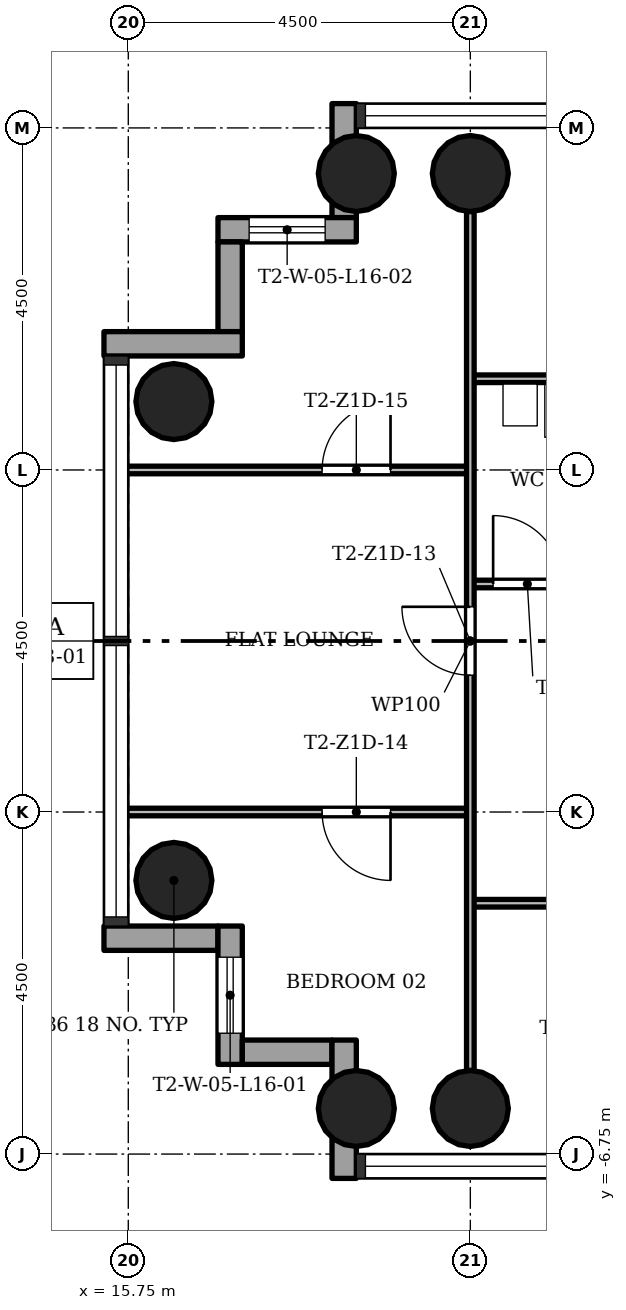
"""IFC4 building model, lengths in metres.
Left out: names, types, materials, properties, quantities, classifications, styles, units other than length and angle.
Written with IfcOpenShell. Run it as: python <this file> out.ifc"""

import sys

from ifc_helpers import new_model, si_unit, direction, frame, frame_2d, origin, origin_2d, place, context, subcontext, project, spatial, rectangle, hollow_circle, extrude, element, fill, save


model = new_model("IFC4")
c1 = context("Model", 3, precision=1e-05, world=origin(), true_north=direction((0.0, 1.0)))
c2 = subcontext(c1, "Body", "Model", "MODEL_VIEW")
j1 = project(units=[si_unit("LENGTHUNIT", "METRE"), si_unit("PLANEANGLEUNIT", "RADIAN")], contexts=[c1])
p1 = place(None, origin())
s1 = spatial("IfcSite", under=j1, at=p1, CompositionType="ELEMENT")
p2 = place(p1, origin())
s2 = spatial("IfcBuilding", under=s1, at=p2, CompositionType="ELEMENT")
p3 = place(p2, frame((0.0, 0.0, 61.9)))
s3 = spatial("IfcBuildingStorey", under=s2, at=p3, CompositionType="ELEMENT", Elevation=61.9)
for number, where, z_axis, x_axis in (
    (1, (20.25, 6.15, 0.0), (0.0, 0.0, 1.0), (1.0, 0.0, 0.0)),
    (2, (20.25, -6.15, 0.0), (0.0, 0.0, 1.0), (1.0, 0.0, 0.0)),
    (3, (18.75, 6.15, 0.0), (0.0, 0.0, 1.0), (1.0, 0.0, 0.0)),
    (4, (18.75, -6.15, 0.0), (0.0, 0.0, 1.0), (1.0, 0.0, 0.0)),
    (5, (16.35, 3.15, 0.0), (0.0, 0.0, 1.0), (1.0, 0.0, 0.0)),
    (6, (16.35, -3.15, 0.0), (0.0, 0.0, 1.0), (1.0, 0.0, 0.0)),
):
    element("IfcColumn", number, at=place(p3, frame(where, z_axis=z_axis, x_axis=x_axis)), inside=s3, PredefinedType="COLUMN", context=c2, shape_type="SweptSolid", body=[
        extrude(hollow_circle(Radius=0.5, WallThickness=0.036, at=origin_2d()), origin(), (0.0, 0.0, 1.0), 3.4),
    ])
p4 = place(p3, frame((18.59, 7.07, -0.3), z_axis=(0.0, 0.0, 1.0), x_axis=(0.0, -1.0, 0.0)))
e7 = element("IfcWall", 7, at=p4, inside=s3, PredefinedType="STANDARD", context=c2, shape_type="SweptSolid", body=[
    extrude(rectangle(XDim=1.5, YDim=0.32, at=frame_2d((0.75, 0.0))), origin(), (0.0, 0.0, 1.0), 3.4),
])
p5 = place(p3, frame((18.75, 5.41, -0.3), z_axis=(0.0, 0.0, 1.0), x_axis=(-1.0, 0.0, 0.0)))
e8 = element("IfcWall", 8, at=p5, inside=s3, PredefinedType="STANDARD", context=c2, shape_type="SweptSolid", body=[
    extrude(rectangle(XDim=1.82, YDim=0.32, at=frame_2d((0.91, 0.0))), origin(), (0.0, 0.0, 1.0), 3.4),
])
p6 = place(p5, frame((0.41, 0.0, 1.2)))
e9 = element("IfcOpeningElement", 9, at=p6, cuts=e8, PredefinedType="OPENING", context=c2, shape_type="SweptSolid", body=[
    extrude(rectangle(XDim=1.0, YDim=1.5, at=frame_2d((0.5, 0.75))), frame((0.0, 0.17, 0.0), z_axis=(0.0, -1.0, 0.0), x_axis=(1.0, 0.0, 0.0)), (0.0, 0.0, 1.0), 0.34),
])
p7 = place(p3, frame((17.09, 5.25, -0.3), z_axis=(0.0, 0.0, 1.0), x_axis=(0.0, -1.0, 0.0)))
e10 = element("IfcWall", 10, at=p7, inside=s3, PredefinedType="STANDARD", context=c2, shape_type="SweptSolid", body=[
    extrude(rectangle(XDim=1.18, YDim=0.32, at=frame_2d((0.59, 0.0))), origin(), (0.0, 0.0, 1.0), 3.4),
])
p8 = place(p3, frame((17.25, 3.91, -0.3), z_axis=(0.0, 0.0, 1.0), x_axis=(-1.0, 0.0, 0.0)))
e11 = element("IfcWall", 11, at=p8, inside=s3, PredefinedType="STANDARD", context=c2, shape_type="SweptSolid", body=[
    extrude(rectangle(XDim=1.82, YDim=0.32, at=frame_2d((0.91, 0.0))), origin(), (0.0, 0.0, 1.0), 3.4),
])
p9 = place(p3, frame((15.43, -3.91, -0.3), z_axis=(0.0, 0.0, 1.0), x_axis=(1.0, 0.0, 0.0)))
e12 = element("IfcWall", 12, at=p9, inside=s3, PredefinedType="STANDARD", context=c2, shape_type="SweptSolid", body=[
    extrude(rectangle(XDim=1.5, YDim=0.32, at=frame_2d((0.75, 0.0))), origin(), (0.0, 0.0, 1.0), 3.4),
])
p10 = place(p3, frame((17.09, -3.75, -0.3), z_axis=(0.0, 0.0, 1.0), x_axis=(0.0, -1.0, 0.0)))
e13 = element("IfcWall", 13, at=p10, inside=s3, PredefinedType="STANDARD", context=c2, shape_type="SweptSolid", body=[
    extrude(rectangle(XDim=1.82, YDim=0.32, at=frame_2d((0.91, 0.0))), origin(), (0.0, 0.0, 1.0), 3.4),
])
p11 = place(p10, frame((0.41, 0.0, 1.2)))
e14 = element("IfcOpeningElement", 14, at=p11, cuts=e13, PredefinedType="OPENING", context=c2, shape_type="SweptSolid", body=[
    extrude(rectangle(XDim=1.0, YDim=1.5, at=frame_2d((0.5, 0.75))), frame((0.0, 0.17, 0.0), z_axis=(0.0, -1.0, 0.0), x_axis=(1.0, 0.0, 0.0)), (0.0, 0.0, 1.0), 0.34),
])
p12 = place(p3, frame((17.25, -5.41, -0.3), z_axis=(0.0, 0.0, 1.0), x_axis=(1.0, 0.0, 0.0)))
e15 = element("IfcWall", 15, at=p12, inside=s3, PredefinedType="STANDARD", context=c2, shape_type="SweptSolid", body=[
    extrude(rectangle(XDim=1.18, YDim=0.32, at=frame_2d((0.59, 0.0))), origin(), (0.0, 0.0, 1.0), 3.4),
])
p13 = place(p3, frame((18.59, -5.25, -0.3), z_axis=(0.0, 0.0, 1.0), x_axis=(0.0, -1.0, 0.0)))
e16 = element("IfcWall", 16, at=p13, inside=s3, PredefinedType="STANDARD", context=c2, shape_type="SweptSolid", body=[
    extrude(rectangle(XDim=1.82, YDim=0.32, at=frame_2d((0.91, 0.0))), origin(), (0.0, 0.0, 1.0), 3.4),
])
p14 = place(p3, frame((24.75, -3.45, 0.0), z_axis=(0.0, 0.0, 1.0), x_axis=(-1.0, 0.0, 0.0)))
e17 = element("IfcWall", 17, at=p14, inside=s3, PredefinedType="PARTITIONING", context=c2, shape_type="SweptSolid", body=[
    extrude(rectangle(XDim=4.5, YDim=0.1, at=frame_2d((2.25, 0.0))), origin(), (0.0, 0.0, 1.0), 3.0),
])
p15 = place(p14, frame((0.15, 0.0, 0.0)))
e18 = element("IfcOpeningElement", 18, at=p15, cuts=e17, PredefinedType="OPENING", context=c2, shape_type="SweptSolid", body=[
    extrude(rectangle(XDim=0.9, YDim=2.1, at=frame_2d((0.45, 1.05))), frame((0.0, 0.06, 0.0), z_axis=(0.0, -1.0, 0.0), x_axis=(1.0, 0.0, 0.0)), (0.0, 0.0, 1.0), 0.12),
])
p16 = place(p3, frame((20.25, -2.25, 0.0), z_axis=(0.0, 0.0, 1.0), x_axis=(-1.0, 0.0, 0.0)))
e19 = element("IfcWall", 19, at=p16, inside=s3, PredefinedType="PARTITIONING", context=c2, shape_type="SweptSolid", body=[
    extrude(rectangle(XDim=4.6, YDim=0.1, at=frame_2d((2.3, 0.0))), origin(), (0.0, 0.0, 1.0), 3.0),
])
p17 = place(p16, frame((1.05, 0.0, 0.0)))
e20 = element("IfcOpeningElement", 20, at=p17, cuts=e19, PredefinedType="OPENING", context=c2, shape_type="SweptSolid", body=[
    extrude(rectangle(XDim=0.9, YDim=2.1, at=frame_2d((0.45, 1.05))), frame((0.0, 0.06, 0.0), z_axis=(0.0, -1.0, 0.0), x_axis=(1.0, 0.0, 0.0)), (0.0, 0.0, 1.0), 0.12),
])
p18 = place(p3, frame((23.55, 0.75, 0.0), z_axis=(0.0, 0.0, 1.0), x_axis=(-1.0, 0.0, 0.0)))
e21 = element("IfcWall", 21, at=p18, inside=s3, PredefinedType="PARTITIONING", context=c2, shape_type="SweptSolid", body=[
    extrude(rectangle(XDim=3.3, YDim=0.1, at=frame_2d((1.65, 0.0))), origin(), (0.0, 0.0, 1.0), 3.0),
])
p19 = place(p18, frame((0.45, 0.0, 0.0)))
e22 = element("IfcOpeningElement", 22, at=p19, cuts=e21, PredefinedType="OPENING", context=c2, shape_type="SweptSolid", body=[
    extrude(rectangle(XDim=0.9, YDim=2.1, at=frame_2d((0.45, 1.05))), frame((0.0, 0.06, 0.0), z_axis=(0.0, -1.0, 0.0), x_axis=(1.0, 0.0, 0.0)), (0.0, 0.0, 1.0), 0.12),
])
p20 = place(p18, frame((2.1, 0.0, 0.0)))
e23 = element("IfcOpeningElement", 23, at=p20, cuts=e21, PredefinedType="OPENING", context=c2, shape_type="SweptSolid", body=[
    extrude(rectangle(XDim=0.9, YDim=2.1, at=frame_2d((0.45, 1.05))), frame((0.0, 0.06, 0.0), z_axis=(0.0, -1.0, 0.0), x_axis=(1.0, 0.0, 0.0)), (0.0, 0.0, 1.0), 0.12),
])
p21 = place(p3, frame((20.25, 2.25, 0.0), z_axis=(0.0, 0.0, 1.0), x_axis=(-1.0, 0.0, 0.0)))
e24 = element("IfcWall", 24, at=p21, inside=s3, PredefinedType="PARTITIONING", context=c2, shape_type="SweptSolid", body=[
    extrude(rectangle(XDim=4.6, YDim=0.1, at=frame_2d((2.3, 0.0))), origin(), (0.0, 0.0, 1.0), 3.0),
])
p22 = place(p21, frame((1.05, 0.0, 0.0)))
e25 = element("IfcOpeningElement", 25, at=p22, cuts=e24, PredefinedType="OPENING", context=c2, shape_type="SweptSolid", body=[
    extrude(rectangle(XDim=0.9, YDim=2.1, at=frame_2d((0.45, 1.05))), frame((0.0, 0.06, 0.0), z_axis=(0.0, -1.0, 0.0), x_axis=(1.0, 0.0, 0.0)), (0.0, 0.0, 1.0), 0.12),
])
p23 = place(p3, frame((24.75, 3.45, 0.0), z_axis=(0.0, 0.0, 1.0), x_axis=(-1.0, 0.0, 0.0)))
e26 = element("IfcWall", 26, at=p23, inside=s3, PredefinedType="PARTITIONING", context=c2, shape_type="SweptSolid", body=[
    extrude(rectangle(XDim=4.5, YDim=0.1, at=frame_2d((2.25, 0.0))), origin(), (0.0, 0.0, 1.0), 3.0),
])
p24 = place(p23, frame((0.15, 0.0, 0.0)))
e27 = element("IfcOpeningElement", 27, at=p24, cuts=e26, PredefinedType="OPENING", context=c2, shape_type="SweptSolid", body=[
    extrude(rectangle(XDim=0.9, YDim=2.1, at=frame_2d((0.45, 1.05))), frame((0.0, 0.06, 0.0), z_axis=(0.0, -1.0, 0.0), x_axis=(1.0, 0.0, 0.0)), (0.0, 0.0, 1.0), 0.12),
])
p25 = place(p3, frame((20.25, -5.65, 0.0), z_axis=(0.0, 0.0, 1.0), x_axis=(0.0, 1.0, 0.0)))
e28 = element("IfcWall", 28, at=p25, inside=s3, PredefinedType="PARTITIONING", context=c2, shape_type="SweptSolid", body=[
    extrude(rectangle(XDim=11.3, YDim=0.1, at=frame_2d((5.65, 0.0))), origin(), (0.0, 0.0, 1.0), 3.0),
])
p26 = place(p25, frame((5.2, 0.0, 0.0)))
e29 = element("IfcOpeningElement", 29, at=p26, cuts=e28, PredefinedType="OPENING", context=c2, shape_type="SweptSolid", body=[
    extrude(rectangle(XDim=0.9, YDim=2.1, at=frame_2d((0.45, 1.05))), frame((0.0, 0.06, 0.0), z_axis=(0.0, -1.0, 0.0), x_axis=(1.0, 0.0, 0.0)), (0.0, 0.0, 1.0), 0.12),
])
p27 = place(p20, origin())
e30 = element("IfcDoor", 30, at=p27, inside=s3, OperationType="SINGLE_SWING_RIGHT", PredefinedType="DOOR", context=c2, shape_type="SweptSolid", body=[
    extrude(rectangle(XDim=0.9, YDim=2.1, at=frame_2d((0.45, 1.05))), frame((0.0, 0.025, 0.0), z_axis=(0.0, -1.0, 0.0), x_axis=(1.0, 0.0, 0.0)), (0.0, 0.0, 1.0), 0.05),
])
fill(e23, e30)
p28 = place(p26, origin())
e31 = element("IfcDoor", 31, at=p28, inside=s3, OperationType="SINGLE_SWING_LEFT", PredefinedType="DOOR", context=c2, shape_type="SweptSolid", body=[
    extrude(rectangle(XDim=0.9, YDim=2.1, at=frame_2d((0.45, 1.05))), frame((0.0, 0.025, 0.0), z_axis=(0.0, -1.0, 0.0), x_axis=(1.0, 0.0, 0.0)), (0.0, 0.0, 1.0), 0.05),
])
fill(e29, e31)
p29 = place(p17, origin())
e32 = element("IfcDoor", 32, at=p29, inside=s3, OperationType="SINGLE_SWING_RIGHT", PredefinedType="DOOR", context=c2, shape_type="SweptSolid", body=[
    extrude(rectangle(XDim=0.9, YDim=2.1, at=frame_2d((0.45, 1.05))), frame((0.0, 0.025, 0.0), z_axis=(0.0, -1.0, 0.0), x_axis=(1.0, 0.0, 0.0)), (0.0, 0.0, 1.0), 0.05),
])
fill(e20, e32)
p30 = place(p22, origin())
e33 = element("IfcDoor", 33, at=p30, inside=s3, OperationType="SINGLE_SWING_LEFT", PredefinedType="DOOR", context=c2, shape_type="SweptSolid", body=[
    extrude(rectangle(XDim=0.9, YDim=2.1, at=frame_2d((0.45, 1.05))), frame((0.0, 0.025, 0.0), z_axis=(0.0, -1.0, 0.0), x_axis=(1.0, 0.0, 0.0)), (0.0, 0.0, 1.0), 0.05),
])
fill(e25, e33)
p31 = place(p11, origin())
e34 = element("IfcWindow", 34, at=p31, inside=s3, PartitioningType="SINGLE_PANEL", PredefinedType="WINDOW", context=c2, shape_type="SweptSolid", body=[
    extrude(rectangle(XDim=1.0, YDim=1.5, at=frame_2d((0.5, 0.75))), frame((0.0, 0.03, 0.0), z_axis=(0.0, -1.0, 0.0), x_axis=(1.0, 0.0, 0.0)), (0.0, 0.0, 1.0), 0.06),
])
fill(e14, e34)
p32 = place(p6, origin())
e35 = element("IfcWindow", 35, at=p32, inside=s3, PartitioningType="SINGLE_PANEL", PredefinedType="WINDOW", context=c2, shape_type="SweptSolid", body=[
    extrude(rectangle(XDim=1.0, YDim=1.5, at=frame_2d((0.5, 0.75))), frame((0.0, 0.03, 0.0), z_axis=(0.0, -1.0, 0.0), x_axis=(1.0, 0.0, 0.0)), (0.0, 0.0, 1.0), 0.06),
])
fill(e9, e35)
save(model, sys.argv[1])
